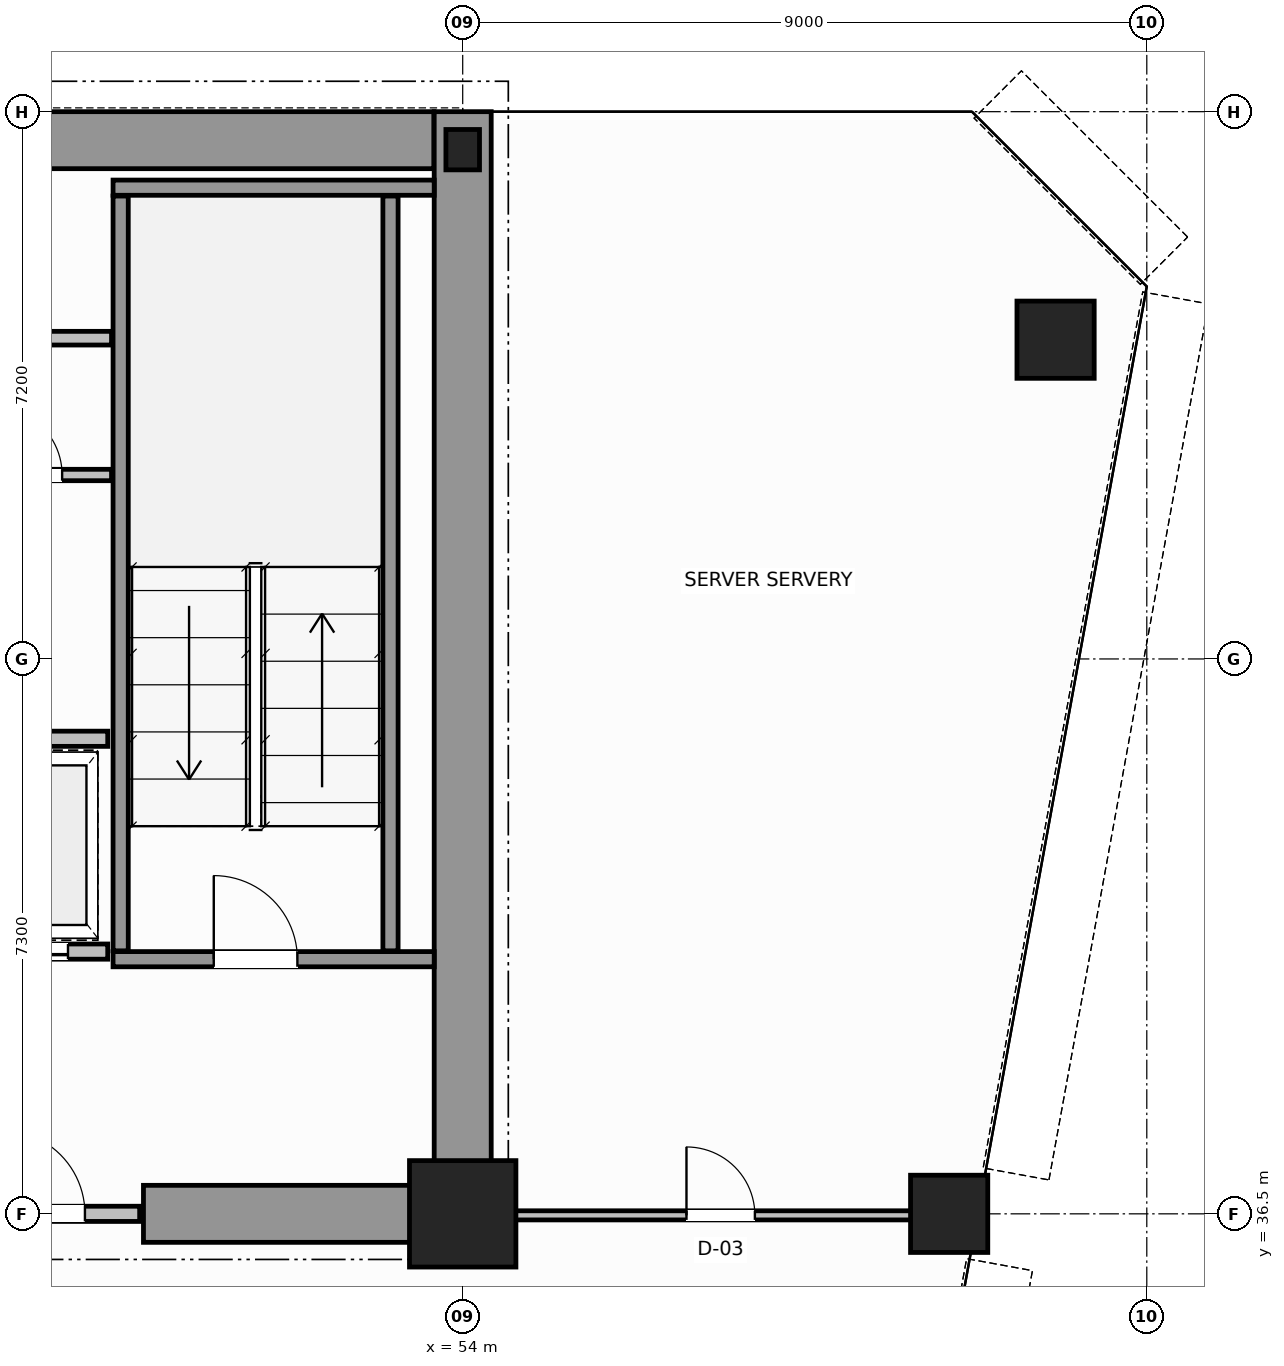
"""IFC4 building model, lengths in metres.
Left out: names, types, materials, properties, quantities, classifications, styles, units other than length and angle.
Written with IfcOpenShell. Run it as: python <this file> out.ifc"""

import sys

from ifc_helpers import new_model, si_unit, direction, frame, frame_2d, origin, origin_2d, place, context, subcontext, project, spatial, rectangle, hollow_circle, i_section, extrude, source, transform, mapped, element, fill, save


model = new_model("IFC4")
c1 = context("Model", 3, precision=1e-05, world=origin(), true_north=direction((0.0, 1.0)))
c2 = subcontext(c1, "Body", "Model", "MODEL_VIEW")
j1 = project(units=[si_unit("LENGTHUNIT", "METRE"), si_unit("PLANEANGLEUNIT", "RADIAN")], contexts=[c1])
p1 = place(None, origin())
s1 = spatial("IfcSite", under=j1, at=p1, CompositionType="ELEMENT")
p2 = place(p1, origin())
s2 = spatial("IfcBuilding", under=s1, at=p2, CompositionType="ELEMENT")
p3 = place(p2, frame((0.0, 0.0, 111.0)))
s3 = spatial("IfcBuildingStorey", under=s2, at=p3, CompositionType="ELEMENT", Elevation=111.0)
m1 = source(origin(), c2, "Body", "SweptSolid", [
    extrude(rectangle(XDim=1.4, YDim=1.4, at=origin_2d()), origin(), (0.0, 0.0, 1.0), 3.8),
])
p4 = place(p3, frame((54.0, 36.5, 0.0), z_axis=(0.0, 0.0, 1.0), x_axis=(1.0, 0.0, 0.0)))
e1 = element("IfcColumn", 1, at=p4, inside=s3, PredefinedType="COLUMN", context=c2, shape_type="MappedRepresentation", body=[
    mapped(m1, transform((0.0, 0.0, 0.0), scale=1.0)),
])
m2 = source(origin(), c2, "Body", "SweptSolid", [
    extrude(i_section(OverallWidth=0.442, OverallDepth=0.531, WebThickness=0.065, FlangeThickness=0.076, FilletRadius=0.015, at=origin_2d()), origin(), (0.0, 0.0, 1.0), 3.8),
])
p5 = place(p3, frame((54.0, 50.5, 0.0), z_axis=(0.0, 0.0, 1.0), x_axis=(1.0, 0.0, 0.0)))
e2 = element("IfcColumn", 2, at=p5, inside=s3, PredefinedType="COLUMN", context=c2, shape_type="MappedRepresentation", body=[
    mapped(m2, transform((0.0, 0.0, 0.0), scale=1.0)),
])
m3 = source(origin(), c2, "Body", "SweptSolid", [
    extrude(hollow_circle(Radius=0.508, WallThickness=0.045, at=origin_2d()), origin(), (0.0, 0.0, 1.0), 3.8),
])
for number, where, z_axis, x_axis in (
    (3, (61.8, 48.0, 0.0), (0.0, 0.0, 1.0), (1.0, 0.0, 0.0)),
    (4, (60.4, 36.5, 0.0), (0.0, 0.0, 1.0), (1.0, 0.0, 0.0)),
):
    element("IfcColumn", number, at=place(p3, frame(where, z_axis=z_axis, x_axis=x_axis)), inside=s3, PredefinedType="COLUMN", context=c2, shape_type="MappedRepresentation", body=[
        mapped(m3, transform((0.0, 0.0, 0.0), scale=1.0)),
    ])
p6 = place(p3, frame((34.002, 50.625, 0.0), z_axis=(0.0, 0.0, 1.0), x_axis=(1.0, 0.0, 0.0)))
e5 = element("IfcWall", 5, at=p6, inside=s3, PredefinedType="SHEAR", context=c2, shape_type="SweptSolid", body=[
    extrude(rectangle(XDim=19.619, YDim=0.75, at=frame_2d((9.81, 0.0))), origin(), (0.0, 0.0, 1.0), 3.8),
])
p7 = place(p3, frame((54.0, 36.5, 0.0), z_axis=(0.0, 0.0, 1.0), x_axis=(0.0, 1.0, 0.0)))
e6 = element("IfcWall", 6, at=p7, inside=s3, PredefinedType="SHEAR", context=c2, shape_type="SweptSolid", body=[
    extrude(rectangle(XDim=14.5, YDim=0.75, at=frame_2d((7.25, 0.0))), origin(), (0.0, 0.0, 1.0), 3.8),
])
p8 = place(p3, frame((49.8, 36.5, 0.0), z_axis=(0.0, 0.0, 1.0), x_axis=(1.0, 0.0, 0.0)))
e7 = element("IfcWall", 7, at=p8, inside=s3, PredefinedType="SHEAR", context=c2, shape_type="SweptSolid", body=[
    extrude(rectangle(XDim=3.805, YDim=0.75, at=frame_2d((1.902, 0.0))), origin(), (0.0, 0.0, 1.0), 2.38),
])
p9 = place(p3, frame((49.4, 39.85, 0.0), z_axis=(0.0, 0.0, 1.0), x_axis=(1.0, 0.0, 0.0)))
e8 = element("IfcWall", 8, at=p9, inside=s3, PredefinedType="SOLIDWALL", context=c2, shape_type="SweptSolid", body=[
    extrude(rectangle(XDim=4.225, YDim=0.2, at=frame_2d((2.113, 0.0))), origin(), (0.0, 0.0, 1.0), 3.8),
])
p10 = place(p9, frame((1.325, 0.0, 0.0)))
e9 = element("IfcOpeningElement", 9, at=p10, cuts=e8, PredefinedType="OPENING", context=c2, shape_type="SweptSolid", body=[
    extrude(rectangle(XDim=1.1, YDim=2.15, at=frame_2d((0.55, 1.075))), frame((0.0, 0.11, 0.0), z_axis=(0.0, -1.0, 0.0), x_axis=(1.0, 0.0, 0.0)), (0.0, 0.0, 1.0), 0.22),
])
p11 = place(p3, frame((49.4, 50.0, 0.0), z_axis=(0.0, 0.0, 1.0), x_axis=(1.0, 0.0, 0.0)))
e10 = element("IfcWall", 10, at=p11, inside=s3, PredefinedType="SOLIDWALL", context=c2, shape_type="SweptSolid", body=[
    extrude(rectangle(XDim=4.225, YDim=0.2, at=frame_2d((2.113, 0.0))), origin(), (0.0, 0.0, 1.0), 3.8),
])
for number, where, z_axis, x_axis in (
    (11, (49.5, 39.96, 0.0), (0.0, 0.0, 1.0), (0.0, 1.0, 0.0)),
    (12, (53.05, 39.96, 0.0), (0.0, 0.0, 1.0), (0.0, 1.0, 0.0)),
):
    element("IfcWall", number, at=place(p3, frame(where, z_axis=z_axis, x_axis=x_axis)), inside=s3, PredefinedType="SOLIDWALL", context=c2, shape_type="SweptSolid", body=[
        extrude(rectangle(XDim=9.93, YDim=0.2, at=frame_2d((4.965, 0.0))), origin(), (0.0, 0.0, 1.0), 3.8),
    ])
p12 = place(p3, frame((47.28, 36.5, 0.0), z_axis=(0.0, 0.0, 1.0), x_axis=(1.0, 0.0, 0.0)))
e13 = element("IfcWall", 13, at=p12, inside=s3, PredefinedType="SOLIDWALL", context=c2, shape_type="SweptSolid", body=[
    extrude(rectangle(XDim=2.47, YDim=0.2, at=frame_2d((1.235, 0.0))), origin(), (0.0, 0.0, 1.0), 2.37),
])
p13 = place(p12, frame((0.65, 0.0, 0.0)))
e14 = element("IfcOpeningElement", 14, at=p13, cuts=e13, PredefinedType="OPENING", context=c2, shape_type="SweptSolid", body=[
    extrude(rectangle(XDim=1.1, YDim=2.15, at=frame_2d((0.55, 1.075))), frame((0.0, 0.11, 0.0), z_axis=(0.0, -1.0, 0.0), x_axis=(1.0, 0.0, 0.0)), (0.0, 0.0, 1.0), 0.22),
])
p14 = place(p3, frame((47.185, 39.95, 0.0), z_axis=(0.0, 0.0, 1.0), x_axis=(1.0, 0.0, 0.0)))
e15 = element("IfcWall", 15, at=p14, inside=s3, PredefinedType="SOLIDWALL", context=c2, shape_type="SweptSolid", body=[
    extrude(rectangle(XDim=2.145, YDim=0.2, at=frame_2d((1.073, 0.0))), origin(), (0.0, 0.0, 1.0), 3.58),
])
p15 = place(p14, frame((0.522, 0.0, 0.0)))
e16 = element("IfcOpeningElement", 16, at=p15, cuts=e15, PredefinedType="OPENING", context=c2, shape_type="SweptSolid", body=[
    extrude(rectangle(XDim=1.1, YDim=2.15, at=frame_2d((0.55, 1.075))), frame((0.0, 0.11, 0.0), z_axis=(0.0, -1.0, 0.0), x_axis=(1.0, 0.0, 0.0)), (0.0, 0.0, 1.0), 0.22),
])
p16 = place(p3, frame((47.185, 42.75, 0.0), z_axis=(0.0, 0.0, 1.0), x_axis=(1.0, 0.0, 0.0)))
e17 = element("IfcWall", 17, at=p16, inside=s3, PredefinedType="SOLIDWALL", context=c2, shape_type="SweptSolid", body=[
    extrude(rectangle(XDim=2.145, YDim=0.2, at=frame_2d((1.073, 0.0))), origin(), (0.0, 0.0, 1.0), 3.58),
])
p17 = place(p3, frame((47.28, 46.22, 0.0), z_axis=(0.0, 0.0, 1.0), x_axis=(1.0, 0.0, 0.0)))
e18 = element("IfcWall", 18, at=p17, inside=s3, PredefinedType="PARTITIONING", context=c2, shape_type="SweptSolid", body=[
    extrude(rectangle(XDim=2.1, YDim=0.15, at=frame_2d((1.05, 0.0))), origin(), (0.0, 0.0, 1.0), 3.58),
])
p18 = place(p17, frame((0.55, 0.0, 0.0)))
e19 = element("IfcOpeningElement", 19, at=p18, cuts=e18, PredefinedType="OPENING", context=c2, shape_type="SweptSolid", body=[
    extrude(rectangle(XDim=0.9, YDim=2.1, at=frame_2d((0.45, 1.05))), frame((0.0, 0.085, 0.0), z_axis=(0.0, -1.0, 0.0), x_axis=(1.0, 0.0, 0.0)), (0.0, 0.0, 1.0), 0.17),
])
p19 = place(p3, frame((18.62, 48.02, 0.0), z_axis=(0.0, 0.0, 1.0), x_axis=(1.0, 0.0, 0.0)))
e20 = element("IfcWall", 20, at=p19, inside=s3, PredefinedType="PLUMBINGWALL", context=c2, shape_type="SweptSolid", body=[
    extrude(rectangle(XDim=30.76, YDim=0.18, at=frame_2d((15.38, 0.0))), origin(), (0.0, 0.0, 1.0), 3.58),
])
p20 = place(p19, frame((1.655, 0.0, 0.0)))
e21 = element("IfcOpeningElement", 21, at=p20, cuts=e20, PredefinedType="OPENING", context=c2, shape_type="SweptSolid", body=[
    extrude(rectangle(XDim=0.9, YDim=2.15, at=frame_2d((0.45, 1.075))), frame((0.0, 0.1, 0.0), z_axis=(0.0, -1.0, 0.0), x_axis=(1.0, 0.0, 0.0)), (0.0, 0.0, 1.0), 0.2),
])
p21 = place(p19, frame((6.03, 0.0, 0.0)))
e22 = element("IfcOpeningElement", 22, at=p21, cuts=e20, PredefinedType="OPENING", context=c2, shape_type="SweptSolid", body=[
    extrude(rectangle(XDim=0.9, YDim=2.15, at=frame_2d((0.45, 1.075))), frame((0.0, 0.1, 0.0), z_axis=(0.0, -1.0, 0.0), x_axis=(1.0, 0.0, 0.0)), (0.0, 0.0, 1.0), 0.2),
])
p22 = place(p19, frame((10.93, 0.0, 0.0)))
e23 = element("IfcOpeningElement", 23, at=p22, cuts=e20, PredefinedType="OPENING", context=c2, shape_type="SweptSolid", body=[
    extrude(rectangle(XDim=0.9, YDim=2.15, at=frame_2d((0.45, 1.075))), frame((0.0, 0.1, 0.0), z_axis=(0.0, -1.0, 0.0), x_axis=(1.0, 0.0, 0.0)), (0.0, 0.0, 1.0), 0.2),
])
p23 = place(p19, frame((16.13, 0.0, 0.0)))
e24 = element("IfcOpeningElement", 24, at=p23, cuts=e20, PredefinedType="OPENING", context=c2, shape_type="SweptSolid", body=[
    extrude(rectangle(XDim=0.9, YDim=2.15, at=frame_2d((0.45, 1.075))), frame((0.0, 0.1, 0.0), z_axis=(0.0, -1.0, 0.0), x_axis=(1.0, 0.0, 0.0)), (0.0, 0.0, 1.0), 0.2),
])
p24 = place(p19, frame((21.73, 0.0, 0.0)))
e25 = element("IfcOpeningElement", 25, at=p24, cuts=e20, PredefinedType="OPENING", context=c2, shape_type="SweptSolid", body=[
    extrude(rectangle(XDim=0.9, YDim=2.15, at=frame_2d((0.45, 1.075))), frame((0.0, 0.1, 0.0), z_axis=(0.0, -1.0, 0.0), x_axis=(1.0, 0.0, 0.0)), (0.0, 0.0, 1.0), 0.2),
])
p25 = place(p19, frame((27.505, 0.0, 0.0)))
e26 = element("IfcOpeningElement", 26, at=p25, cuts=e20, PredefinedType="OPENING", context=c2, shape_type="SweptSolid", body=[
    extrude(rectangle(XDim=0.9, YDim=2.15, at=frame_2d((0.45, 1.075))), frame((0.0, 0.1, 0.0), z_axis=(0.0, -1.0, 0.0), x_axis=(1.0, 0.0, 0.0)), (0.0, 0.0, 1.0), 0.2),
])
p26 = place(p3, frame((54.06, 36.48, 0.0), z_axis=(0.0, 0.0, 1.0), x_axis=(1.0, 0.0, 0.0)))
e27 = element("IfcWall", 27, at=p26, inside=s3, PredefinedType="PARTITIONING", context=c2, shape_type="SweptSolid", body=[
    extrude(rectangle(XDim=6.668, YDim=0.12, at=frame_2d((3.334, 0.0))), origin(), (0.0, 0.0, 1.0), 2.87),
])
p27 = place(p26, frame((2.884, 0.0, 0.0)))
e28 = element("IfcOpeningElement", 28, at=p27, cuts=e27, PredefinedType="OPENING", context=c2, shape_type="SweptSolid", body=[
    extrude(rectangle(XDim=0.9, YDim=2.15, at=frame_2d((0.45, 1.075))), frame((0.0, 0.07, 0.0), z_axis=(0.0, -1.0, 0.0), x_axis=(1.0, 0.0, 0.0)), (0.0, 0.0, 1.0), 0.14),
])
m4 = source(origin(), c2, "Body", "SweptSolid", [
    extrude(rectangle(XDim=1.1, YDim=2.15, at=frame_2d((0.55, 1.075))), frame((0.0, 0.025, 0.0), z_axis=(0.0, -1.0, 0.0), x_axis=(1.0, 0.0, 0.0)), (0.0, 0.0, 1.0), 0.05),
])
p28 = place(p10, origin())
e29 = element("IfcDoor", 29, at=p28, inside=s3, OperationType="SINGLE_SWING_RIGHT", PredefinedType="DOOR", context=c2, shape_type="MappedRepresentation", body=[
    mapped(m4, transform((0.0, 0.0, 0.0), scale=1.0)),
])
fill(e9, e29)
p29 = place(p13, origin())
e30 = element("IfcDoor", 30, at=p29, inside=s3, OperationType="SINGLE_SWING_LEFT", PredefinedType="DOOR", context=c2, shape_type="MappedRepresentation", body=[
    mapped(m4, transform((0.0, 0.0, 0.0), scale=1.0)),
])
fill(e14, e30)
p30 = place(p15, origin())
e31 = element("IfcDoor", 31, at=p30, inside=s3, OperationType="DOUBLE_DOOR_SLIDING", PredefinedType="DOOR", context=c2, shape_type="MappedRepresentation", body=[
    mapped(m4, transform((0.0, 0.0, 0.0), scale=1.0)),
])
fill(e16, e31)
m5 = source(origin(), c2, "Body", "SweptSolid", [
    extrude(rectangle(XDim=0.9, YDim=2.1, at=frame_2d((0.45, 1.05))), frame((0.0, 0.025, 0.0), z_axis=(0.0, -1.0, 0.0), x_axis=(1.0, 0.0, 0.0)), (0.0, 0.0, 1.0), 0.05),
])
p31 = place(p18, origin())
e32 = element("IfcDoor", 32, at=p31, inside=s3, OperationType="SINGLE_SWING_RIGHT", PredefinedType="DOOR", context=c2, shape_type="MappedRepresentation", body=[
    mapped(m5, transform((0.0, 0.0, 0.0), scale=1.0)),
])
fill(e19, e32)
m6 = source(origin(), c2, "Body", "SweptSolid", [
    extrude(rectangle(XDim=0.9, YDim=2.15, at=frame_2d((0.45, 1.075))), frame((0.0, 0.025, 0.0), z_axis=(0.0, -1.0, 0.0), x_axis=(1.0, 0.0, 0.0)), (0.0, 0.0, 1.0), 0.05),
])
p32 = place(p27, origin())
e33 = element("IfcDoor", 33, at=p32, inside=s3, OperationType="SINGLE_SWING_RIGHT", PredefinedType="DOOR", context=c2, shape_type="MappedRepresentation", body=[
    mapped(m6, transform((0.0, 0.0, 0.0), scale=1.0)),
])
fill(e28, e33)
save(model, sys.argv[1])
